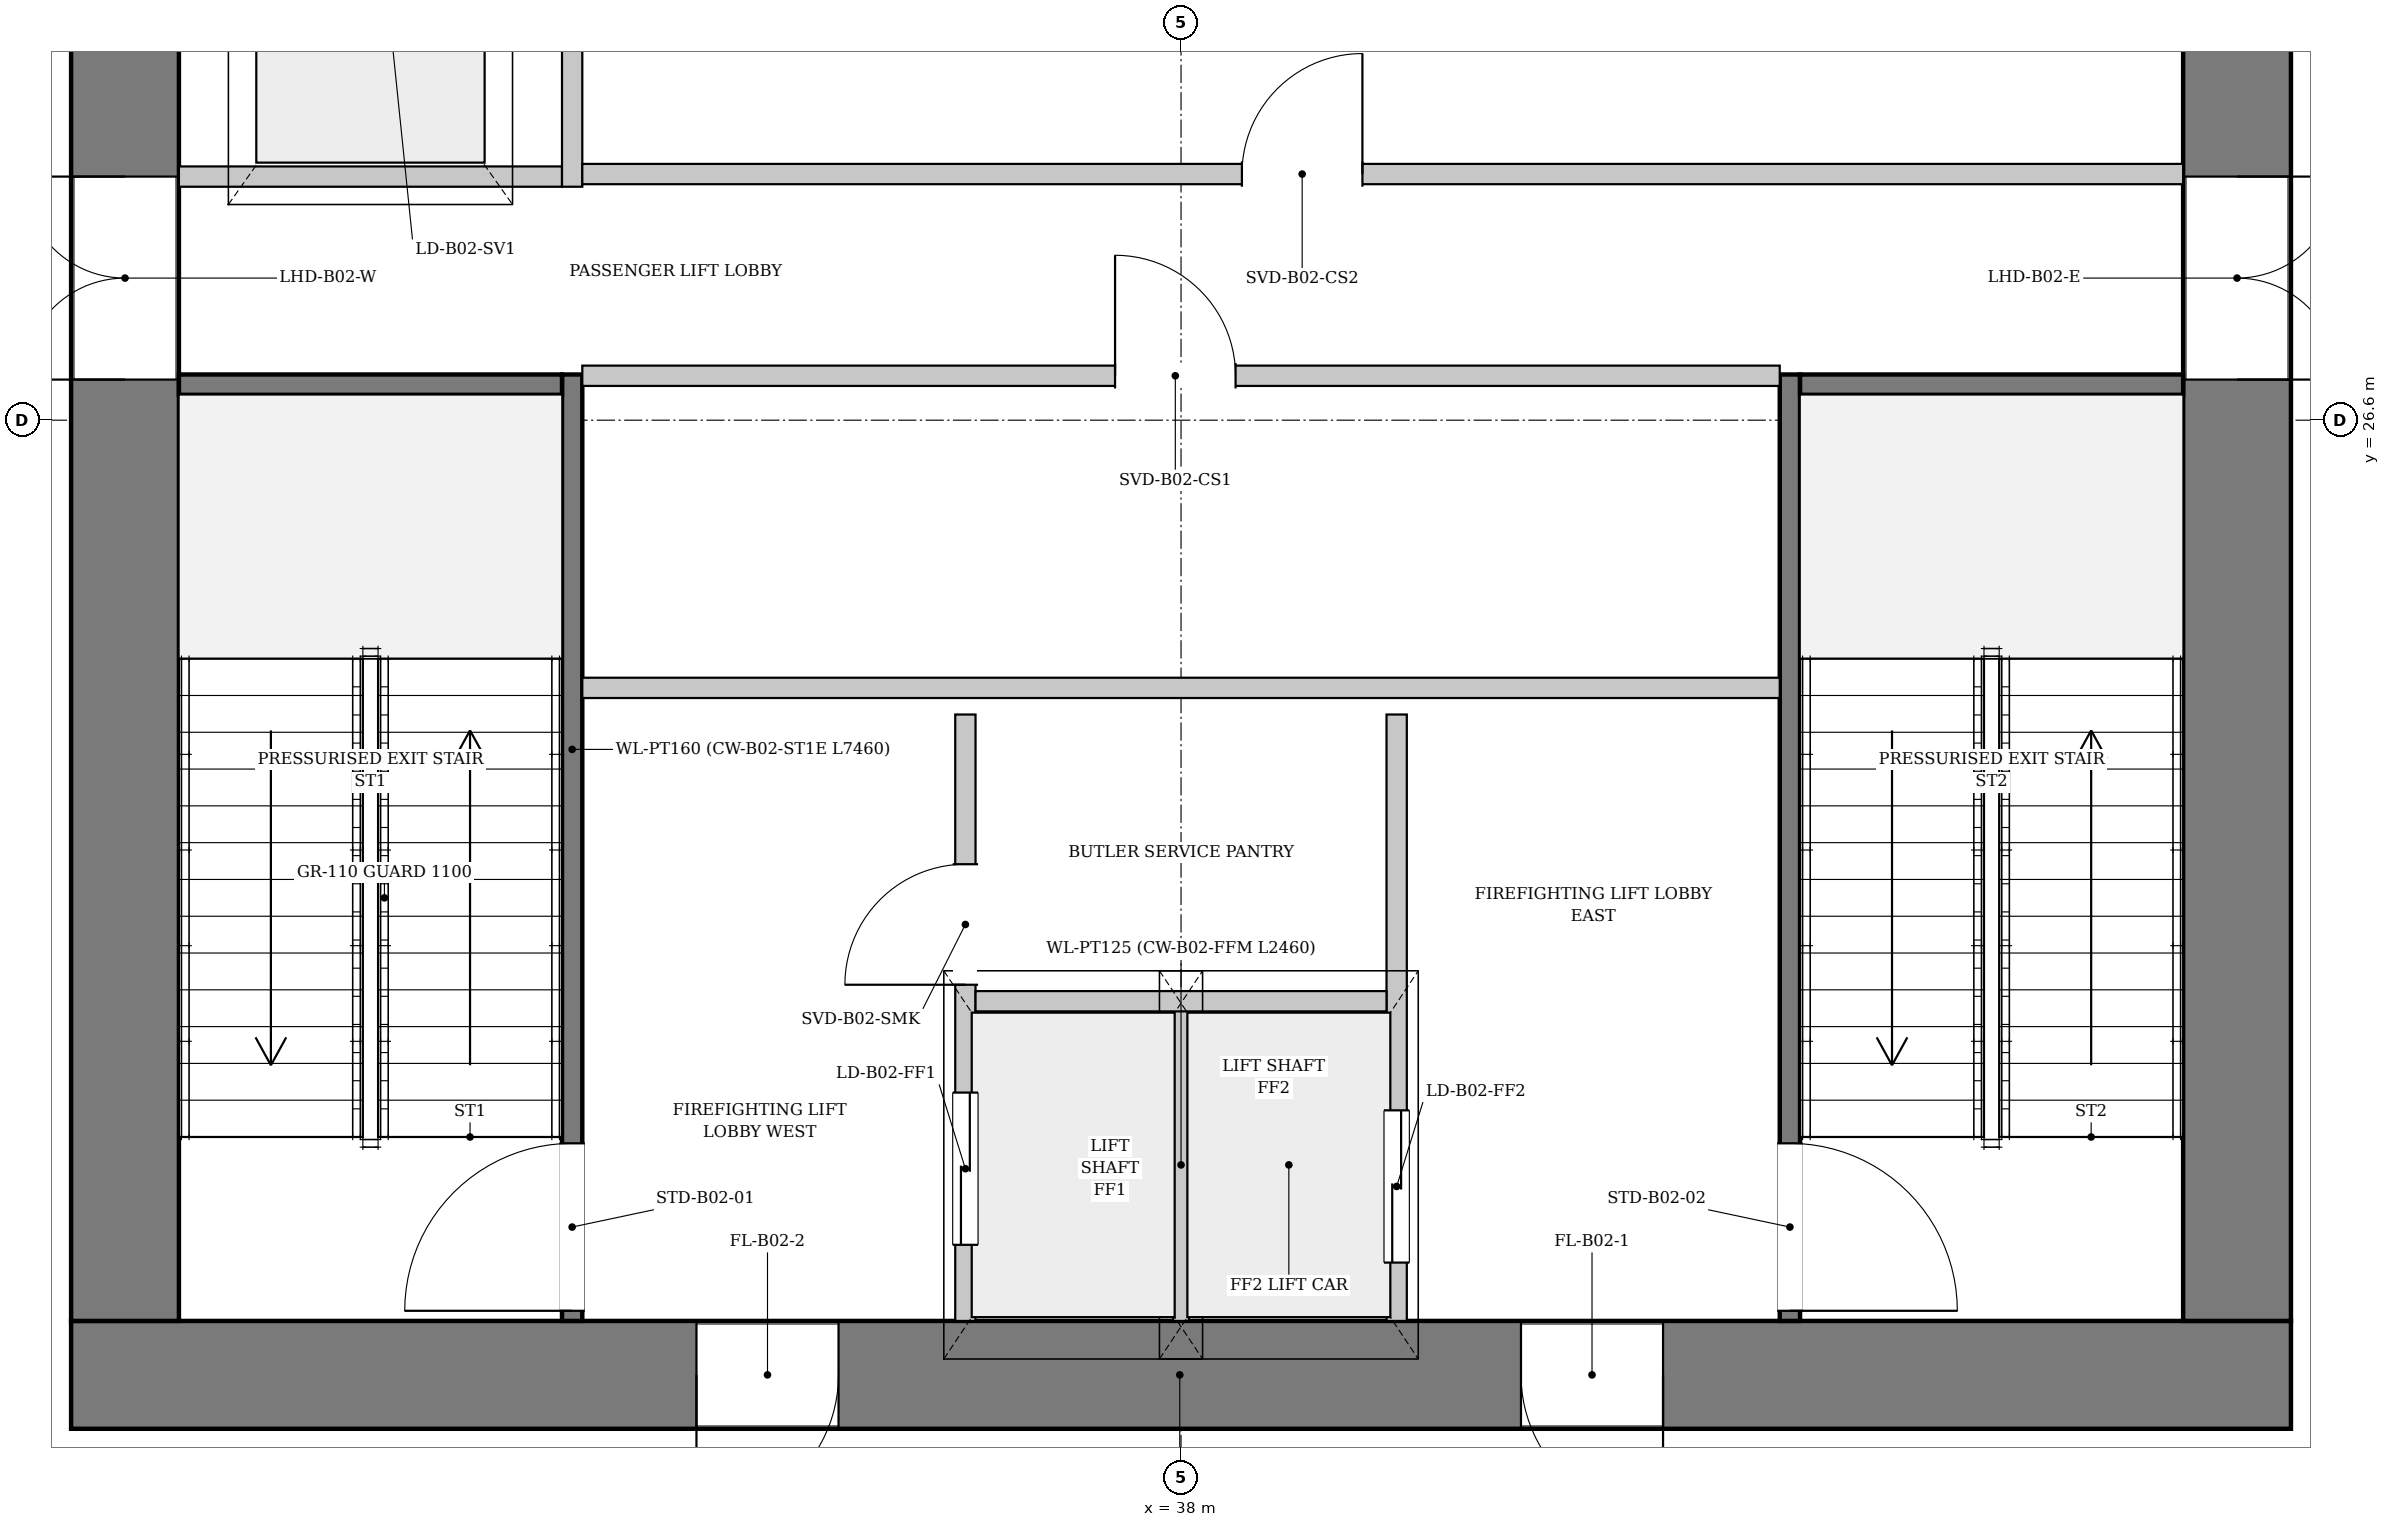
"""IFC4 building model, lengths in metres.
Left out: names, types, materials, properties, quantities, classifications, styles, units other than length and angle.
Written with IfcOpenShell. Run it as: python <this file> out.ifc"""

import sys

from ifc_helpers import new_model, si_unit, direction, frame, frame_2d, origin, place, context, subcontext, project, spatial, rectangle, extrude, source, transform, mapped, element, fill, save


model = new_model("IFC4")
c1 = context("Model", 3, precision=1e-05, world=origin(), true_north=direction((0.0, 1.0)))
c2 = subcontext(c1, "Body", "Model", "MODEL_VIEW")
j1 = project(units=[si_unit("LENGTHUNIT", "METRE"), si_unit("PLANEANGLEUNIT", "RADIAN")], contexts=[c1])
p1 = place(None, origin())
s1 = spatial("IfcSite", under=j1, at=p1, CompositionType="ELEMENT")
p2 = place(p1, origin())
s2 = spatial("IfcBuilding", under=s1, at=p2, CompositionType="ELEMENT")
p3 = place(p2, frame((0.0, 0.0, -9.6)))
s3 = spatial("IfcBuildingStorey", under=s2, at=p3, CompositionType="ELEMENT", Elevation=-9.6)
p4 = place(p3, frame((46.75, 19.075, 0.0), z_axis=(0.0, 0.0, 1.0), x_axis=(-1.0, 0.0, 0.0)))
e1 = element("IfcWall", 1, at=p4, inside=s3, PredefinedType="SHEAR", context=c2, shape_type="SweptSolid", body=[
    extrude(rectangle(XDim=17.5, YDim=0.85, at=frame_2d((8.75, 0.0))), origin(), (0.0, 0.0, 1.0), 4.45),
])
p5 = place(p4, frame((4.95, 0.0, 0.0)))
e2 = element("IfcOpeningElement", 2, at=p5, cuts=e1, PredefinedType="OPENING", context=c2, shape_type="SweptSolid", body=[
    extrude(rectangle(XDim=1.12, YDim=2.25, at=frame_2d((0.56, 1.125))), frame((0.0, 0.435, 0.0), z_axis=(0.0, -1.0, 0.0), x_axis=(1.0, 0.0, 0.0)), (0.0, 0.0, 1.0), 0.87),
])
p6 = place(p4, frame((11.45, 0.0, 0.0)))
e3 = element("IfcOpeningElement", 3, at=p6, cuts=e1, PredefinedType="OPENING", context=c2, shape_type="SweptSolid", body=[
    extrude(rectangle(XDim=1.12, YDim=2.25, at=frame_2d((0.56, 1.125))), frame((0.0, 0.435, 0.0), z_axis=(0.0, -1.0, 0.0), x_axis=(1.0, 0.0, 0.0)), (0.0, 0.0, 1.0), 0.87),
])
p7 = place(p3, frame((29.675, 19.5, 0.0), z_axis=(0.0, 0.0, 1.0), x_axis=(0.0, 1.0, 0.0)))
e4 = element("IfcWall", 4, at=p7, inside=s3, PredefinedType="SHEAR", context=c2, shape_type="SweptSolid", body=[
    extrude(rectangle(XDim=14.2, YDim=0.85, at=frame_2d((7.1, 0.0))), origin(), (0.0, 0.0, 1.0), 4.45),
])
p8 = place(p7, frame((7.42, 0.0, 0.0)))
e5 = element("IfcOpeningElement", 5, at=p8, cuts=e4, PredefinedType="OPENING", context=c2, shape_type="SweptSolid", body=[
    extrude(rectangle(XDim=1.6, YDim=2.2, at=frame_2d((0.8, 1.1))), frame((0.0, 0.435, 0.0), z_axis=(0.0, -1.0, 0.0), x_axis=(1.0, 0.0, 0.0)), (0.0, 0.0, 1.0), 0.87),
])
p9 = place(p3, frame((46.325, 33.7, 0.0), z_axis=(0.0, 0.0, 1.0), x_axis=(0.0, -1.0, 0.0)))
e6 = element("IfcWall", 6, at=p9, inside=s3, PredefinedType="SHEAR", context=c2, shape_type="SweptSolid", body=[
    extrude(rectangle(XDim=14.2, YDim=0.85, at=frame_2d((7.1, 0.0))), origin(), (0.0, 0.0, 1.0), 4.45),
])
p10 = place(p9, frame((5.18, 0.0, 0.0)))
e7 = element("IfcOpeningElement", 7, at=p10, cuts=e6, PredefinedType="OPENING", context=c2, shape_type="SweptSolid", body=[
    extrude(rectangle(XDim=1.6, YDim=2.2, at=frame_2d((0.8, 1.1))), frame((0.0, 0.435, 0.0), z_axis=(0.0, -1.0, 0.0), x_axis=(1.0, 0.0, 0.0)), (0.0, 0.0, 1.0), 0.87),
])
p11 = place(p3, frame((33.2, 19.5, 0.0), z_axis=(0.0, 0.0, 1.0), x_axis=(0.0, 1.0, 0.0)))
e8 = element("IfcWall", 8, at=p11, inside=s3, PredefinedType="PARTITIONING", context=c2, shape_type="SweptSolid", body=[
    extrude(rectangle(XDim=7.46, YDim=0.16, at=frame_2d((3.73, 0.0))), origin(), (0.0, 0.0, 1.0), 4.45),
])
p12 = place(p11, frame((0.08, 0.0, 0.0)))
e9 = element("IfcOpeningElement", 9, at=p12, cuts=e8, PredefinedType="OPENING", context=c2, shape_type="SweptSolid", body=[
    extrude(rectangle(XDim=1.32, YDim=2.2, at=frame_2d((0.66, 1.1))), frame((0.0, 0.09, 0.0), z_axis=(0.0, -1.0, 0.0), x_axis=(1.0, 0.0, 0.0)), (0.0, 0.0, 1.0), 0.18),
])
p13 = place(p3, frame((30.1, 26.88, 0.0), z_axis=(0.0, 0.0, 1.0), x_axis=(1.0, 0.0, 0.0)))
e10 = element("IfcWall", 10, at=p13, inside=s3, PredefinedType="PARTITIONING", context=c2, shape_type="SweptSolid", body=[
    extrude(rectangle(XDim=3.02, YDim=0.16, at=frame_2d((1.51, 0.0))), origin(), (0.0, 0.0, 1.0), 4.45),
])
p14 = place(p3, frame((42.8, 26.96, 0.0), z_axis=(0.0, 0.0, 1.0), x_axis=(0.0, -1.0, 0.0)))
e11 = element("IfcWall", 11, at=p14, inside=s3, PredefinedType="PARTITIONING", context=c2, shape_type="SweptSolid", body=[
    extrude(rectangle(XDim=7.46, YDim=0.16, at=frame_2d((3.73, 0.0))), origin(), (0.0, 0.0, 1.0), 4.45),
])
p15 = place(p14, frame((6.06, 0.0, 0.0)))
e12 = element("IfcOpeningElement", 12, at=p15, cuts=e11, PredefinedType="OPENING", context=c2, shape_type="SweptSolid", body=[
    extrude(rectangle(XDim=1.32, YDim=2.2, at=frame_2d((0.66, 1.1))), frame((0.0, 0.09, 0.0), z_axis=(0.0, -1.0, 0.0), x_axis=(1.0, 0.0, 0.0)), (0.0, 0.0, 1.0), 0.18),
])
p16 = place(p3, frame((42.88, 26.88, 0.0), z_axis=(0.0, 0.0, 1.0), x_axis=(1.0, 0.0, 0.0)))
e13 = element("IfcWall", 13, at=p16, inside=s3, PredefinedType="PARTITIONING", context=c2, shape_type="SweptSolid", body=[
    extrude(rectangle(XDim=3.02, YDim=0.16, at=frame_2d((1.51, 0.0))), origin(), (0.0, 0.0, 1.0), 4.45),
])
p17 = place(p3, frame((36.3, 19.5, 0.0), z_axis=(0.0, 0.0, 1.0), x_axis=(0.0, 1.0, 0.0)))
e14 = element("IfcWall", 14, at=p17, inside=s3, PredefinedType="PARTITIONING", context=c2, shape_type="SweptSolid", body=[
    extrude(rectangle(XDim=4.78, YDim=0.16, at=frame_2d((2.39, 0.0))), origin(), (0.0, 0.0, 1.0), 4.45),
])
p18 = place(p17, frame((0.6, 0.0, 0.0)))
e15 = element("IfcOpeningElement", 15, at=p18, cuts=e14, PredefinedType="OPENING", context=c2, shape_type="SweptSolid", body=[
    extrude(rectangle(XDim=1.2, YDim=2.2, at=frame_2d((0.6, 1.1))), frame((0.0, 0.09, 0.0), z_axis=(0.0, -1.0, 0.0), x_axis=(1.0, 0.0, 0.0)), (0.0, 0.0, 1.0), 0.18),
])
p19 = place(p17, frame((2.65, 0.0, 0.0)))
e16 = element("IfcOpeningElement", 16, at=p19, cuts=e14, PredefinedType="OPENING", context=c2, shape_type="SweptSolid", body=[
    extrude(rectangle(XDim=0.95, YDim=2.1, at=frame_2d((0.475, 1.05))), frame((0.0, 0.09, 0.0), z_axis=(0.0, -1.0, 0.0), x_axis=(1.0, 0.0, 0.0)), (0.0, 0.0, 1.0), 0.18),
])
p20 = place(p3, frame((39.7, 24.28, 0.0), z_axis=(0.0, 0.0, 1.0), x_axis=(0.0, -1.0, 0.0)))
e17 = element("IfcWall", 17, at=p20, inside=s3, PredefinedType="PARTITIONING", context=c2, shape_type="SweptSolid", body=[
    extrude(rectangle(XDim=4.78, YDim=0.16, at=frame_2d((2.39, 0.0))), origin(), (0.0, 0.0, 1.0), 4.45),
])
p21 = place(p20, frame((3.12, 0.0, 0.0)))
e18 = element("IfcOpeningElement", 18, at=p21, cuts=e17, PredefinedType="OPENING", context=c2, shape_type="SweptSolid", body=[
    extrude(rectangle(XDim=1.2, YDim=2.2, at=frame_2d((0.6, 1.1))), frame((0.0, 0.09, 0.0), z_axis=(0.0, -1.0, 0.0), x_axis=(1.0, 0.0, 0.0)), (0.0, 0.0, 1.0), 0.18),
])
p22 = place(p3, frame((38.0, 19.5, 0.0), z_axis=(0.0, 0.0, 1.0), x_axis=(0.0, 1.0, 0.0)))
e19 = element("IfcWall", 19, at=p22, inside=s3, PredefinedType="PARTITIONING", context=c2, shape_type="SweptSolid", body=[
    extrude(rectangle(XDim=2.46, YDim=0.125, at=frame_2d((1.23, 0.0))), origin(), (0.0, 0.0, 1.0), 4.45),
])
p23 = place(p3, frame((36.38, 22.02, 0.0), z_axis=(0.0, 0.0, 1.0), x_axis=(1.0, 0.0, 0.0)))
e20 = element("IfcWall", 20, at=p23, inside=s3, PredefinedType="PARTITIONING", context=c2, shape_type="SweptSolid", body=[
    extrude(rectangle(XDim=3.24, YDim=0.16, at=frame_2d((1.62, 0.0))), origin(), (0.0, 0.0, 1.0), 4.45),
])
p24 = place(p3, frame((33.28, 24.49, 0.0), z_axis=(0.0, 0.0, 1.0), x_axis=(1.0, 0.0, 0.0)))
e21 = element("IfcWall", 21, at=p24, inside=s3, PredefinedType="PARTITIONING", context=c2, shape_type="SweptSolid", body=[
    extrude(rectangle(XDim=9.44, YDim=0.16, at=frame_2d((4.72, 0.0))), origin(), (0.0, 0.0, 1.0), 4.45),
])
p25 = place(p3, frame((30.1, 28.52, 0.0), z_axis=(0.0, 0.0, 1.0), x_axis=(1.0, 0.0, 0.0)))
e22 = element("IfcWall", 22, at=p25, inside=s3, PredefinedType="PARTITIONING", context=c2, shape_type="SweptSolid", body=[
    extrude(rectangle(XDim=3.02, YDim=0.16, at=frame_2d((1.51, 0.0))), origin(), (0.0, 0.0, 1.0), 4.45),
])
p26 = place(p3, frame((33.2, 28.44, 0.0), z_axis=(0.0, 0.0, 1.0), x_axis=(0.0, 1.0, 0.0)))
e23 = element("IfcWall", 23, at=p26, inside=s3, PredefinedType="PARTITIONING", context=c2, shape_type="SweptSolid", body=[
    extrude(rectangle(XDim=5.26, YDim=0.16, at=frame_2d((2.63, 0.0))), origin(), (0.0, 0.0, 1.0), 4.45),
])
p27 = place(p3, frame((33.28, 26.95, 0.0), z_axis=(0.0, 0.0, 1.0), x_axis=(1.0, 0.0, 0.0)))
e24 = element("IfcWall", 24, at=p27, inside=s3, PredefinedType="PARTITIONING", context=c2, shape_type="SweptSolid", body=[
    extrude(rectangle(XDim=9.44, YDim=0.16, at=frame_2d((4.72, 0.0))), origin(), (0.0, 0.0, 1.0), 4.45),
])
p28 = place(p27, frame((4.2, 0.0, 0.0)))
e25 = element("IfcOpeningElement", 25, at=p28, cuts=e24, PredefinedType="OPENING", context=c2, shape_type="SweptSolid", body=[
    extrude(rectangle(XDim=0.95, YDim=2.1, at=frame_2d((0.475, 1.05))), frame((0.0, 0.09, 0.0), z_axis=(0.0, -1.0, 0.0), x_axis=(1.0, 0.0, 0.0)), (0.0, 0.0, 1.0), 0.18),
])
p29 = place(p3, frame((33.28, 28.54, 0.0), z_axis=(0.0, 0.0, 1.0), x_axis=(1.0, 0.0, 0.0)))
e26 = element("IfcWall", 26, at=p29, inside=s3, PredefinedType="PARTITIONING", context=c2, shape_type="SweptSolid", body=[
    extrude(rectangle(XDim=12.62, YDim=0.16, at=frame_2d((6.31, 0.0))), origin(), (0.0, 0.0, 1.0), 4.45),
])
p30 = place(p29, frame((5.2, 0.0, 0.0)))
e27 = element("IfcOpeningElement", 27, at=p30, cuts=e26, PredefinedType="OPENING", context=c2, shape_type="SweptSolid", body=[
    extrude(rectangle(XDim=0.95, YDim=2.1, at=frame_2d((0.475, 1.05))), frame((0.0, 0.09, 0.0), z_axis=(0.0, -1.0, 0.0), x_axis=(1.0, 0.0, 0.0)), (0.0, 0.0, 1.0), 0.18),
])
m1 = source(origin(), c2, "Body", "SweptSolid", [
    extrude(rectangle(XDim=1.12, YDim=2.25, at=frame_2d((0.56, 1.125))), frame((0.0, 0.025, 0.0), z_axis=(0.0, -1.0, 0.0), x_axis=(1.0, 0.0, 0.0)), (0.0, 0.0, 1.0), 0.05),
])
p31 = place(p5, origin())
e28 = element("IfcDoor", 28, at=p31, inside=s3, OperationType="SINGLE_SWING_LEFT", PredefinedType="DOOR", context=c2, shape_type="MappedRepresentation", body=[
    mapped(m1, transform((0.0, 0.0, 0.0), x_axis=(1.0, 0.0, 0.0), y_axis=(0.0, 1.0, 0.0), z_axis=(0.0, 0.0, 1.0), scale=1.0)),
])
fill(e2, e28)
p32 = place(p6, origin())
e29 = element("IfcDoor", 29, at=p32, inside=s3, OperationType="SINGLE_SWING_RIGHT", PredefinedType="DOOR", context=c2, shape_type="MappedRepresentation", body=[
    mapped(m1, transform((0.0, 0.0, 0.0), x_axis=(1.0, 0.0, 0.0), y_axis=(0.0, 1.0, 0.0), z_axis=(0.0, 0.0, 1.0), scale=1.0)),
])
fill(e3, e29)
m2 = source(origin(), c2, "Body", "SweptSolid", [
    extrude(rectangle(XDim=1.6, YDim=2.2, at=frame_2d((0.8, 1.1))), frame((0.0, 0.025, 0.0), z_axis=(0.0, -1.0, 0.0), x_axis=(1.0, 0.0, 0.0)), (0.0, 0.0, 1.0), 0.05),
])
p33 = place(p8, origin())
e30 = element("IfcDoor", 30, at=p33, inside=s3, OperationType="DOUBLE_DOOR_SINGLE_SWING", PredefinedType="DOOR", context=c2, shape_type="MappedRepresentation", body=[
    mapped(m2, transform((0.0, 0.0, 0.0), x_axis=(1.0, 0.0, 0.0), y_axis=(0.0, 1.0, 0.0), z_axis=(0.0, 0.0, 1.0), scale=1.0)),
])
fill(e5, e30)
p34 = place(p10, origin())
e31 = element("IfcDoor", 31, at=p34, inside=s3, OperationType="DOUBLE_DOOR_SINGLE_SWING", PredefinedType="DOOR", context=c2, shape_type="MappedRepresentation", body=[
    mapped(m2, transform((0.0, 0.0, 0.0), x_axis=(1.0, 0.0, 0.0), y_axis=(0.0, 1.0, 0.0), z_axis=(0.0, 0.0, 1.0), scale=1.0)),
])
fill(e7, e31)
m3 = source(origin(), c2, "Body", "SweptSolid", [
    extrude(rectangle(XDim=1.32, YDim=2.2, at=frame_2d((0.66, 1.1))), frame((0.0, 0.025, 0.0), z_axis=(0.0, -1.0, 0.0), x_axis=(1.0, 0.0, 0.0)), (0.0, 0.0, 1.0), 0.05),
])
p35 = place(p12, origin())
e32 = element("IfcDoor", 32, at=p35, inside=s3, OperationType="SINGLE_SWING_LEFT", PredefinedType="DOOR", context=c2, shape_type="MappedRepresentation", body=[
    mapped(m3, transform((0.0, 0.0, 0.0), x_axis=(1.0, 0.0, 0.0), y_axis=(0.0, 1.0, 0.0), z_axis=(0.0, 0.0, 1.0), scale=1.0)),
])
fill(e9, e32)
p36 = place(p15, origin())
e33 = element("IfcDoor", 33, at=p36, inside=s3, OperationType="SINGLE_SWING_RIGHT", PredefinedType="DOOR", context=c2, shape_type="MappedRepresentation", body=[
    mapped(m3, transform((0.0, 0.0, 0.0), x_axis=(1.0, 0.0, 0.0), y_axis=(0.0, 1.0, 0.0), z_axis=(0.0, 0.0, 1.0), scale=1.0)),
])
fill(e12, e33)
m4 = source(origin(), c2, "Body", "SweptSolid", [
    extrude(rectangle(XDim=1.2, YDim=2.2, at=frame_2d((0.6, 1.1))), frame((0.0, 0.025, 0.0), z_axis=(0.0, -1.0, 0.0), x_axis=(1.0, 0.0, 0.0)), (0.0, 0.0, 1.0), 0.05),
])
p37 = place(p18, origin())
e34 = element("IfcDoor", 34, at=p37, inside=s3, OperationType="DOUBLE_DOOR_SLIDING", PredefinedType="DOOR", context=c2, shape_type="MappedRepresentation", body=[
    mapped(m4, transform((0.0, 0.0, 0.0), x_axis=(1.0, 0.0, 0.0), y_axis=(0.0, 1.0, 0.0), z_axis=(0.0, 0.0, 1.0), scale=1.0)),
])
fill(e15, e34)
m5 = source(origin(), c2, "Body", "SweptSolid", [
    extrude(rectangle(XDim=0.95, YDim=2.1, at=frame_2d((0.475, 1.05))), frame((0.0, 0.025, 0.0), z_axis=(0.0, -1.0, 0.0), x_axis=(1.0, 0.0, 0.0)), (0.0, 0.0, 1.0), 0.05),
])
p38 = place(p19, origin())
e35 = element("IfcDoor", 35, at=p38, inside=s3, OperationType="SINGLE_SWING_LEFT", PredefinedType="DOOR", context=c2, shape_type="MappedRepresentation", body=[
    mapped(m5, transform((0.0, 0.0, 0.0), x_axis=(1.0, 0.0, 0.0), y_axis=(0.0, 1.0, 0.0), z_axis=(0.0, 0.0, 1.0), scale=1.0)),
])
fill(e16, e35)
p39 = place(p21, origin())
e36 = element("IfcDoor", 36, at=p39, inside=s3, OperationType="DOUBLE_DOOR_SLIDING", PredefinedType="DOOR", context=c2, shape_type="MappedRepresentation", body=[
    mapped(m4, transform((0.0, 0.0, 0.0), x_axis=(1.0, 0.0, 0.0), y_axis=(0.0, 1.0, 0.0), z_axis=(0.0, 0.0, 1.0), scale=1.0)),
])
fill(e18, e36)
p40 = place(p28, origin())
e37 = element("IfcDoor", 37, at=p40, inside=s3, OperationType="SINGLE_SWING_LEFT", PredefinedType="DOOR", context=c2, shape_type="MappedRepresentation", body=[
    mapped(m5, transform((0.0, 0.0, 0.0), x_axis=(1.0, 0.0, 0.0), y_axis=(0.0, 1.0, 0.0), z_axis=(0.0, 0.0, 1.0), scale=1.0)),
])
fill(e25, e37)
p41 = place(p30, origin())
e38 = element("IfcDoor", 38, at=p41, inside=s3, OperationType="SINGLE_SWING_RIGHT", PredefinedType="DOOR", context=c2, shape_type="MappedRepresentation", body=[
    mapped(m5, transform((0.0, 0.0, 0.0), x_axis=(1.0, 0.0, 0.0), y_axis=(0.0, 1.0, 0.0), z_axis=(0.0, 0.0, 1.0), scale=1.0)),
])
fill(e27, e38)
save(model, sys.argv[1])
